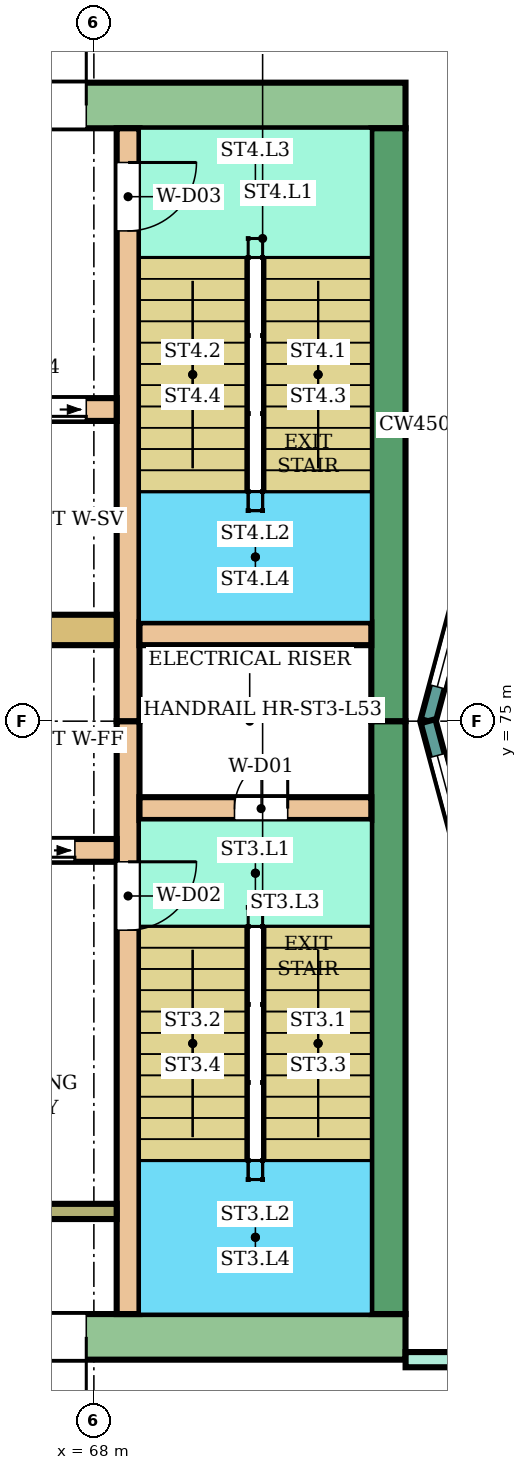
"""IFC4 building model, lengths in metres.
Left out: names, types, materials, properties, quantities, classifications, styles, units other than length and angle.
Written with IfcOpenShell. Run it as: python <this file> out.ifc"""

import sys

from ifc_helpers import new_model, si_unit, direction, frame, frame_2d, origin, place, context, subcontext, project, spatial, rectangle, extrude, element, fill, save


model = new_model("IFC4")
c1 = context("Model", 3, precision=1e-05, world=origin(), true_north=direction((0.0, 1.0)))
c2 = subcontext(c1, "Body", "Model", "MODEL_VIEW")
j1 = project(units=[si_unit("LENGTHUNIT", "METRE"), si_unit("PLANEANGLEUNIT", "RADIAN")], contexts=[c1])
p1 = place(None, origin())
s1 = spatial("IfcSite", under=j1, at=p1, CompositionType="ELEMENT")
p2 = place(p1, origin())
s2 = spatial("IfcBuilding", under=s1, at=p2, CompositionType="ELEMENT")
p3 = place(p2, frame((0.0, 0.0, 229.3)))
s3 = spatial("IfcBuildingStorey", under=s2, at=p3, CompositionType="ELEMENT", Elevation=229.3)
p4 = place(p3, frame((72.1, 66.9, 0.0), z_axis=(0.0, 0.0, 1.0), x_axis=(-1.0, 0.0, 0.0)))
e1 = element("IfcWall", 1, at=p4, inside=s3, PredefinedType="SHEAR", context=c2, shape_type="SweptSolid", body=[
    extrude(rectangle(XDim=14.9, YDim=0.6, at=frame_2d((7.45, 0.0))), origin(), (0.0, 0.0, 1.0), 7.68),
])
p5 = place(p4, frame((4.2, 0.0, 0.0)))
e2 = element("IfcOpeningElement", 2, at=p5, cuts=e1, PredefinedType="OPENING", context=c2, shape_type="SweptSolid", body=[
    extrude(rectangle(XDim=2.4, YDim=2.4, at=frame_2d((1.2, 1.2))), frame((0.0, 0.31, 0.0), z_axis=(0.0, -1.0, 0.0), x_axis=(1.0, 0.0, 0.0)), (0.0, 0.0, 1.0), 0.62),
])
p6 = place(p3, frame((72.1, 83.1, 0.0), z_axis=(0.0, 0.0, 1.0), x_axis=(-1.0, 0.0, 0.0)))
e3 = element("IfcWall", 3, at=p6, inside=s3, PredefinedType="SHEAR", context=c2, shape_type="SweptSolid", body=[
    extrude(rectangle(XDim=14.9, YDim=0.6, at=frame_2d((7.45, 0.0))), origin(), (0.0, 0.0, 1.0), 7.68),
])
p7 = place(p6, frame((4.2, 0.0, 0.0)))
e4 = element("IfcOpeningElement", 4, at=p7, cuts=e3, PredefinedType="OPENING", context=c2, shape_type="SweptSolid", body=[
    extrude(rectangle(XDim=2.4, YDim=2.4, at=frame_2d((1.2, 1.2))), frame((0.0, 0.31, 0.0), z_axis=(0.0, -1.0, 0.0), x_axis=(1.0, 0.0, 0.0)), (0.0, 0.0, 1.0), 0.62),
])
for number, where, z_axis, x_axis in (
    (5, (71.875, 75.0, 0.0), (0.0, 0.0, 1.0), (0.0, -1.0, 0.0)),
    (6, (71.875, 82.8, 0.0), (0.0, 0.0, 1.0), (0.0, -1.0, 0.0)),
):
    element("IfcWall", number, at=place(p3, frame(where, z_axis=z_axis, x_axis=x_axis)), inside=s3, PredefinedType="SHEAR", context=c2, shape_type="SweptSolid", body=[
        extrude(rectangle(XDim=7.8, YDim=0.45, at=frame_2d((3.9, 0.0))), origin(), (0.0, 0.0, 1.0), 7.68),
    ])
p8 = place(p3, frame((68.45, 75.0, 0.0), z_axis=(0.0, 0.0, 1.0), x_axis=(0.0, -1.0, 0.0)))
e7 = element("IfcWall", 7, at=p8, inside=s3, PredefinedType="SHEAR", context=c2, shape_type="SweptSolid", body=[
    extrude(rectangle(XDim=7.8, YDim=0.3, at=frame_2d((3.9, 0.0))), origin(), (0.0, 0.0, 1.0), 7.68),
])
p9 = place(p8, frame((1.85, 0.0, 0.0)))
e8 = element("IfcOpeningElement", 8, at=p9, cuts=e7, PredefinedType="OPENING", context=c2, shape_type="SweptSolid", body=[
    extrude(rectangle(XDim=0.9, YDim=2.1, at=frame_2d((0.45, 1.05))), frame((0.0, 0.16, 0.0), z_axis=(0.0, -1.0, 0.0), x_axis=(1.0, 0.0, 0.0)), (0.0, 0.0, 1.0), 0.32),
])
p10 = place(p3, frame((68.45, 82.8, 0.0), z_axis=(0.0, 0.0, 1.0), x_axis=(0.0, -1.0, 0.0)))
e9 = element("IfcWall", 9, at=p10, inside=s3, PredefinedType="SHEAR", context=c2, shape_type="SweptSolid", body=[
    extrude(rectangle(XDim=7.8, YDim=0.3, at=frame_2d((3.9, 0.0))), origin(), (0.0, 0.0, 1.0), 7.68),
])
p11 = place(p10, frame((0.45, 0.0, 0.0)))
e10 = element("IfcOpeningElement", 10, at=p11, cuts=e9, PredefinedType="OPENING", context=c2, shape_type="SweptSolid", body=[
    extrude(rectangle(XDim=0.9, YDim=2.1, at=frame_2d((0.45, 1.05))), frame((0.0, 0.16, 0.0), z_axis=(0.0, -1.0, 0.0), x_axis=(1.0, 0.0, 0.0)), (0.0, 0.0, 1.0), 0.32),
])
p12 = place(p3, frame((71.65, 73.85, 0.0), z_axis=(0.0, 0.0, 1.0), x_axis=(-1.0, 0.0, 0.0)))
e11 = element("IfcWall", 11, at=p12, inside=s3, PredefinedType="SHEAR", context=c2, shape_type="SweptSolid", body=[
    extrude(rectangle(XDim=3.05, YDim=0.3, at=frame_2d((1.525, 0.0))), origin(), (0.0, 0.0, 1.0), 7.68),
])
p13 = place(p12, frame((1.1, 0.0, 0.0)))
e12 = element("IfcOpeningElement", 12, at=p13, cuts=e11, PredefinedType="OPENING", context=c2, shape_type="SweptSolid", body=[
    extrude(rectangle(XDim=0.7, YDim=2.0, at=frame_2d((0.35, 1.0))), frame((0.0, 0.16, 0.0), z_axis=(0.0, -1.0, 0.0), x_axis=(1.0, 0.0, 0.0)), (0.0, 0.0, 1.0), 0.32),
])
p14 = place(p3, frame((71.65, 76.15, 0.0), z_axis=(0.0, 0.0, 1.0), x_axis=(-1.0, 0.0, 0.0)))
e13 = element("IfcWall", 13, at=p14, inside=s3, PredefinedType="SHEAR", context=c2, shape_type="SweptSolid", body=[
    extrude(rectangle(XDim=3.05, YDim=0.3, at=frame_2d((1.525, 0.0))), origin(), (0.0, 0.0, 1.0), 7.68),
])
p15 = place(p3, frame((68.3, 73.3, 0.0), z_axis=(0.0, 0.0, 1.0), x_axis=(-1.0, 0.0, 0.0)))
e14 = element("IfcWall", 14, at=p15, inside=s3, PredefinedType="SHEAR", context=c2, shape_type="SweptSolid", body=[
    extrude(rectangle(XDim=11.1, YDim=0.3, at=frame_2d((5.55, 0.0))), origin(), (0.0, 0.0, 1.0), 7.68),
])
p16 = place(p15, frame((0.55, 0.0, 0.0)))
e15 = element("IfcOpeningElement", 15, at=p16, cuts=e14, PredefinedType="OPENING", context=c2, shape_type="SweptSolid", body=[
    extrude(rectangle(XDim=1.1, YDim=2.1, at=frame_2d((0.55, 1.05))), frame((0.0, 0.16, 0.0), z_axis=(0.0, -1.0, 0.0), x_axis=(1.0, 0.0, 0.0)), (0.0, 0.0, 1.0), 0.32),
])
p17 = place(p15, frame((3.0, 0.0, 0.0)))
e16 = element("IfcOpeningElement", 16, at=p17, cuts=e14, PredefinedType="OPENING", context=c2, shape_type="SweptSolid", body=[
    extrude(rectangle(XDim=1.2, YDim=2.1, at=frame_2d((0.6, 1.05))), frame((0.0, 0.16, 0.0), z_axis=(0.0, -1.0, 0.0), x_axis=(1.0, 0.0, 0.0)), (0.0, 0.0, 1.0), 0.32),
])
p18 = place(p15, frame((5.5, 0.0, 0.0)))
e17 = element("IfcOpeningElement", 17, at=p18, cuts=e14, PredefinedType="OPENING", context=c2, shape_type="SweptSolid", body=[
    extrude(rectangle(XDim=1.2, YDim=2.1, at=frame_2d((0.6, 1.05))), frame((0.0, 0.16, 0.0), z_axis=(0.0, -1.0, 0.0), x_axis=(1.0, 0.0, 0.0)), (0.0, 0.0, 1.0), 0.32),
])
p19 = place(p15, frame((8.13, 0.0, 0.0)))
e18 = element("IfcOpeningElement", 18, at=p19, cuts=e14, PredefinedType="OPENING", context=c2, shape_type="SweptSolid", body=[
    extrude(rectangle(XDim=0.9, YDim=2.1, at=frame_2d((0.45, 1.05))), frame((0.0, 0.16, 0.0), z_axis=(0.0, -1.0, 0.0), x_axis=(1.0, 0.0, 0.0)), (0.0, 0.0, 1.0), 0.32),
])
p20 = place(p15, frame((9.93, 0.0, 0.0)))
e19 = element("IfcOpeningElement", 19, at=p20, cuts=e14, PredefinedType="OPENING", context=c2, shape_type="SweptSolid", body=[
    extrude(rectangle(XDim=0.9, YDim=2.1, at=frame_2d((0.45, 1.05))), frame((0.0, 0.16, 0.0), z_axis=(0.0, -1.0, 0.0), x_axis=(1.0, 0.0, 0.0)), (0.0, 0.0, 1.0), 0.32),
])
p21 = place(p3, frame((68.3, 76.2, 0.0), z_axis=(0.0, 0.0, 1.0), x_axis=(-1.0, 0.0, 0.0)))
e20 = element("IfcWall", 20, at=p21, inside=s3, PredefinedType="SHEAR", context=c2, shape_type="SweptSolid", body=[
    extrude(rectangle(XDim=11.1, YDim=0.4, at=frame_2d((5.55, 0.0))), origin(), (0.0, 0.0, 1.0), 7.68),
])
p22 = place(p3, frame((68.3, 79.1, 0.0), z_axis=(0.0, 0.0, 1.0), x_axis=(-1.0, 0.0, 0.0)))
e21 = element("IfcWall", 21, at=p22, inside=s3, PredefinedType="SHEAR", context=c2, shape_type="SweptSolid", body=[
    extrude(rectangle(XDim=11.1, YDim=0.3, at=frame_2d((5.55, 0.0))), origin(), (0.0, 0.0, 1.0), 7.68),
])
p23 = place(p22, frame((0.4, 0.0, 0.0)))
e22 = element("IfcOpeningElement", 22, at=p23, cuts=e21, PredefinedType="OPENING", context=c2, shape_type="SweptSolid", body=[
    extrude(rectangle(XDim=1.4, YDim=2.1, at=frame_2d((0.7, 1.05))), frame((0.0, 0.16, 0.0), z_axis=(0.0, -1.0, 0.0), x_axis=(1.0, 0.0, 0.0)), (0.0, 0.0, 1.0), 0.32),
])
p24 = place(p22, frame((3.0, 0.0, 0.0)))
e23 = element("IfcOpeningElement", 23, at=p24, cuts=e21, PredefinedType="OPENING", context=c2, shape_type="SweptSolid", body=[
    extrude(rectangle(XDim=1.2, YDim=2.1, at=frame_2d((0.6, 1.05))), frame((0.0, 0.16, 0.0), z_axis=(0.0, -1.0, 0.0), x_axis=(1.0, 0.0, 0.0)), (0.0, 0.0, 1.0), 0.32),
])
p25 = place(p22, frame((6.38, 0.0, 0.0)))
e24 = element("IfcOpeningElement", 24, at=p25, cuts=e21, PredefinedType="OPENING", context=c2, shape_type="SweptSolid", body=[
    extrude(rectangle(XDim=0.9, YDim=2.1, at=frame_2d((0.45, 1.05))), frame((0.0, 0.16, 0.0), z_axis=(0.0, -1.0, 0.0), x_axis=(1.0, 0.0, 0.0)), (0.0, 0.0, 1.0), 0.32),
])
p26 = place(p22, frame((9.43, 0.0, 0.0)))
e25 = element("IfcOpeningElement", 25, at=p26, cuts=e21, PredefinedType="OPENING", context=c2, shape_type="SweptSolid", body=[
    extrude(rectangle(XDim=0.9, YDim=2.1, at=frame_2d((0.45, 1.05))), frame((0.0, 0.16, 0.0), z_axis=(0.0, -1.0, 0.0), x_axis=(1.0, 0.0, 0.0)), (0.0, 0.0, 1.0), 0.32),
])
p27 = place(p3, frame((68.3, 68.55, 0.0), z_axis=(0.0, 0.0, 1.0), x_axis=(-1.0, 0.0, 0.0)))
e26 = element("IfcWall", 26, at=p27, inside=s3, PredefinedType="SHEAR", context=c2, shape_type="SweptSolid", body=[
    extrude(rectangle(XDim=4.35, YDim=0.2, at=frame_2d((2.175, 0.0))), origin(), (0.0, 0.0, 1.0), 7.68),
])
p28 = place(p3, frame((73.415, 78.802, 0.0), z_axis=(0.0, 0.0, 1.0), x_axis=(-0.258789828301, -0.965933654434, 0.0)))
e27 = element("IfcWall", 27, at=p28, inside=s3, PredefinedType="NOTDEFINED", context=c2, shape_type="SweptSolid", body=[
    extrude(rectangle(XDim=3.936, YDim=0.2, at=frame_2d((1.968, 0.0))), origin(), (0.0, 0.0, 1.0), 8.0),
])
p29 = place(p28, frame((0.468, 0.0, 0.9)))
e28 = element("IfcOpeningElement", 28, at=p29, cuts=e27, PredefinedType="OPENING", context=c2, shape_type="SweptSolid", body=[
    extrude(rectangle(XDim=3.0, YDim=2.3, at=frame_2d((1.5, 1.15))), frame((0.0, 0.11, 0.0), z_axis=(0.0, -1.0, 0.0), x_axis=(1.0, 0.0, 0.0)), (0.0, 0.0, 1.0), 0.22),
])
p30 = place(p3, frame((72.396, 75.0, 0.0), z_axis=(0.0, 0.0, 1.0), x_axis=(0.258789828301, -0.965933654434, 0.0)))
e29 = element("IfcWall", 29, at=p30, inside=s3, PredefinedType="NOTDEFINED", context=c2, shape_type="SweptSolid", body=[
    extrude(rectangle(XDim=3.936, YDim=0.2, at=frame_2d((1.968, 0.0))), origin(), (0.0, 0.0, 1.0), 8.0),
])
p31 = place(p30, frame((0.468, 0.0, 0.9)))
e30 = element("IfcOpeningElement", 30, at=p31, cuts=e29, PredefinedType="OPENING", context=c2, shape_type="SweptSolid", body=[
    extrude(rectangle(XDim=3.0, YDim=2.3, at=frame_2d((1.5, 1.15))), frame((0.0, 0.11, 0.0), z_axis=(0.0, -1.0, 0.0), x_axis=(1.0, 0.0, 0.0)), (0.0, 0.0, 1.0), 0.22),
])
p32 = place(p3, frame((75.525, 82.751, 0.0), z_axis=(0.0, 0.0, 1.0), x_axis=(-0.499996545922, 0.866027397988, 0.0)))
e31 = element("IfcWall", 31, at=p32, inside=s3, PredefinedType="NOTDEFINED", context=c2, shape_type="SweptSolid", body=[
    extrude(rectangle(XDim=8.25, YDim=0.2, at=frame_2d((4.125, 0.0))), origin(), (0.0, 0.0, 1.0), 8.0),
])
p33 = place(p32, frame((1.0, 0.0, 0.3)))
e32 = element("IfcOpeningElement", 32, at=p33, cuts=e31, PredefinedType="OPENING", context=c2, shape_type="SweptSolid", body=[
    extrude(rectangle(XDim=2.4, YDim=3.6, at=frame_2d((1.2, 1.8))), frame((0.0, 0.11, 0.0), z_axis=(0.0, -1.0, 0.0), x_axis=(1.0, 0.0, 0.0)), (0.0, 0.0, 1.0), 0.22),
])
p34 = place(p32, frame((3.85, 0.0, 0.0)))
e33 = element("IfcOpeningElement", 33, at=p34, cuts=e31, PredefinedType="OPENING", context=c2, shape_type="SweptSolid", body=[
    extrude(rectangle(XDim=1.8, YDim=2.4, at=frame_2d((0.9, 1.2))), frame((0.0, 0.11, 0.0), z_axis=(0.0, -1.0, 0.0), x_axis=(1.0, 0.0, 0.0)), (0.0, 0.0, 1.0), 0.22),
])
p35 = place(p32, frame((6.1, 0.0, 0.3)))
e34 = element("IfcOpeningElement", 34, at=p35, cuts=e31, PredefinedType="OPENING", context=c2, shape_type="SweptSolid", body=[
    extrude(rectangle(XDim=1.6, YDim=3.6, at=frame_2d((0.8, 1.8))), frame((0.0, 0.11, 0.0), z_axis=(0.0, -1.0, 0.0), x_axis=(1.0, 0.0, 0.0)), (0.0, 0.0, 1.0), 0.22),
])
p36 = place(p3, frame((75.525, 67.249, 0.0), z_axis=(0.0, 0.0, 1.0), x_axis=(-0.499996545922, -0.866027397988, 0.0)))
e35 = element("IfcWall", 35, at=p36, inside=s3, PredefinedType="NOTDEFINED", context=c2, shape_type="SweptSolid", body=[
    extrude(rectangle(XDim=8.25, YDim=0.2, at=frame_2d((4.125, 0.0))), origin(), (0.0, 0.0, 1.0), 8.0),
])
p37 = place(p36, frame((1.0, 0.0, 0.3)))
e36 = element("IfcOpeningElement", 36, at=p37, cuts=e35, PredefinedType="OPENING", context=c2, shape_type="SweptSolid", body=[
    extrude(rectangle(XDim=2.4, YDim=3.6, at=frame_2d((1.2, 1.8))), frame((0.0, 0.11, 0.0), z_axis=(0.0, -1.0, 0.0), x_axis=(1.0, 0.0, 0.0)), (0.0, 0.0, 1.0), 0.22),
])
p38 = place(p36, frame((3.85, 0.0, 0.0)))
e37 = element("IfcOpeningElement", 37, at=p38, cuts=e35, PredefinedType="OPENING", context=c2, shape_type="SweptSolid", body=[
    extrude(rectangle(XDim=1.8, YDim=2.4, at=frame_2d((0.9, 1.2))), frame((0.0, 0.11, 0.0), z_axis=(0.0, -1.0, 0.0), x_axis=(1.0, 0.0, 0.0)), (0.0, 0.0, 1.0), 0.22),
])
p39 = place(p36, frame((6.1, 0.0, 0.3)))
e38 = element("IfcOpeningElement", 38, at=p39, cuts=e35, PredefinedType="OPENING", context=c2, shape_type="SweptSolid", body=[
    extrude(rectangle(XDim=1.6, YDim=3.6, at=frame_2d((0.8, 1.8))), frame((0.0, 0.11, 0.0), z_axis=(0.0, -1.0, 0.0), x_axis=(1.0, 0.0, 0.0)), (0.0, 0.0, 1.0), 0.22),
])
p40 = place(p3, frame((72.101, 66.6, 0.0), z_axis=(0.0, 0.0, 1.0), x_axis=(1.0, 0.0, 0.0)))
e39 = element("IfcWall", 39, at=p40, inside=s3, PredefinedType="PARTITIONING", context=c2, shape_type="SweptSolid", body=[
    extrude(rectangle(XDim=3.048, YDim=0.2, at=frame_2d((1.524, 0.0))), origin(), (0.0, 0.0, 1.0), 7.55),
])
p41 = place(p29, origin())
e40 = element("IfcWindow", 40, at=p41, inside=s3, PartitioningType="SINGLE_PANEL", PredefinedType="WINDOW", context=c2, shape_type="SweptSolid", body=[
    extrude(rectangle(XDim=3.0, YDim=2.3, at=frame_2d((1.5, 1.15))), frame((0.0, 0.03, 0.0), z_axis=(0.0, -1.0, 0.0), x_axis=(1.0, 0.0, 0.0)), (0.0, 0.0, 1.0), 0.06),
])
fill(e28, e40)
p42 = place(p31, origin())
e41 = element("IfcWindow", 41, at=p42, inside=s3, PartitioningType="SINGLE_PANEL", PredefinedType="WINDOW", context=c2, shape_type="SweptSolid", body=[
    extrude(rectangle(XDim=3.0, YDim=2.3, at=frame_2d((1.5, 1.15))), frame((0.0, 0.03, 0.0), z_axis=(0.0, -1.0, 0.0), x_axis=(1.0, 0.0, 0.0)), (0.0, 0.0, 1.0), 0.06),
])
fill(e30, e41)
p43 = place(p13, frame((0.7, 0.0, 0.0), z_axis=(0.0, 0.0, 1.0), x_axis=(-1.0, 0.0, 0.0)))
e42 = element("IfcDoor", 42, at=p43, inside=s3, OperationType="SINGLE_SWING_RIGHT", PredefinedType="DOOR", context=c2, shape_type="SweptSolid", body=[
    extrude(rectangle(XDim=0.7, YDim=2.0, at=frame_2d((0.35, 1.0))), frame((0.0, 0.025, 0.0), z_axis=(0.0, -1.0, 0.0), x_axis=(1.0, 0.0, 0.0)), (0.0, 0.0, 1.0), 0.05),
])
fill(e12, e42)
p44 = place(p9, origin())
e43 = element("IfcDoor", 43, at=p44, inside=s3, OperationType="SINGLE_SWING_LEFT", PredefinedType="DOOR", context=c2, shape_type="SweptSolid", body=[
    extrude(rectangle(XDim=0.9, YDim=2.1, at=frame_2d((0.45, 1.05))), frame((0.0, 0.025, 0.0), z_axis=(0.0, -1.0, 0.0), x_axis=(1.0, 0.0, 0.0)), (0.0, 0.0, 1.0), 0.05),
])
fill(e8, e43)
p45 = place(p11, origin())
e44 = element("IfcDoor", 44, at=p45, inside=s3, OperationType="SINGLE_SWING_LEFT", PredefinedType="DOOR", context=c2, shape_type="SweptSolid", body=[
    extrude(rectangle(XDim=0.9, YDim=2.1, at=frame_2d((0.45, 1.05))), frame((0.0, 0.025, 0.0), z_axis=(0.0, -1.0, 0.0), x_axis=(1.0, 0.0, 0.0)), (0.0, 0.0, 1.0), 0.05),
])
fill(e10, e44)
p46 = place(p16, origin())
e45 = element("IfcDoor", 45, at=p46, inside=s3, OperationType="DOUBLE_DOOR_SLIDING", PredefinedType="DOOR", context=c2, shape_type="SweptSolid", body=[
    extrude(rectangle(XDim=1.1, YDim=2.1, at=frame_2d((0.55, 1.05))), frame((0.0, 0.025, 0.0), z_axis=(0.0, -1.0, 0.0), x_axis=(1.0, 0.0, 0.0)), (0.0, 0.0, 1.0), 0.05),
])
fill(e15, e45)
p47 = place(p23, origin())
e46 = element("IfcDoor", 46, at=p47, inside=s3, OperationType="DOUBLE_DOOR_SLIDING", PredefinedType="DOOR", context=c2, shape_type="SweptSolid", body=[
    extrude(rectangle(XDim=1.4, YDim=2.1, at=frame_2d((0.7, 1.05))), frame((0.0, 0.025, 0.0), z_axis=(0.0, -1.0, 0.0), x_axis=(1.0, 0.0, 0.0)), (0.0, 0.0, 1.0), 0.05),
])
fill(e22, e46)
p48 = place(p5, origin())
e47 = element("IfcDoor", 47, at=p48, inside=s3, OperationType="DOUBLE_DOOR_SINGLE_SWING", PredefinedType="DOOR", context=c2, shape_type="SweptSolid", body=[
    extrude(rectangle(XDim=2.4, YDim=2.4, at=frame_2d((1.2, 1.2))), frame((0.0, 0.025, 0.0), z_axis=(0.0, -1.0, 0.0), x_axis=(1.0, 0.0, 0.0)), (0.0, 0.0, 1.0), 0.05),
])
fill(e2, e47)
p49 = place(p7, frame((2.4, 0.0, 0.0), z_axis=(0.0, 0.0, 1.0), x_axis=(-1.0, 0.0, 0.0)))
e48 = element("IfcDoor", 48, at=p49, inside=s3, OperationType="DOUBLE_DOOR_SINGLE_SWING", PredefinedType="DOOR", context=c2, shape_type="SweptSolid", body=[
    extrude(rectangle(XDim=2.4, YDim=2.4, at=frame_2d((1.2, 1.2))), frame((0.0, 0.025, 0.0), z_axis=(0.0, -1.0, 0.0), x_axis=(1.0, 0.0, 0.0)), (0.0, 0.0, 1.0), 0.05),
])
fill(e4, e48)
save(model, sys.argv[1])
